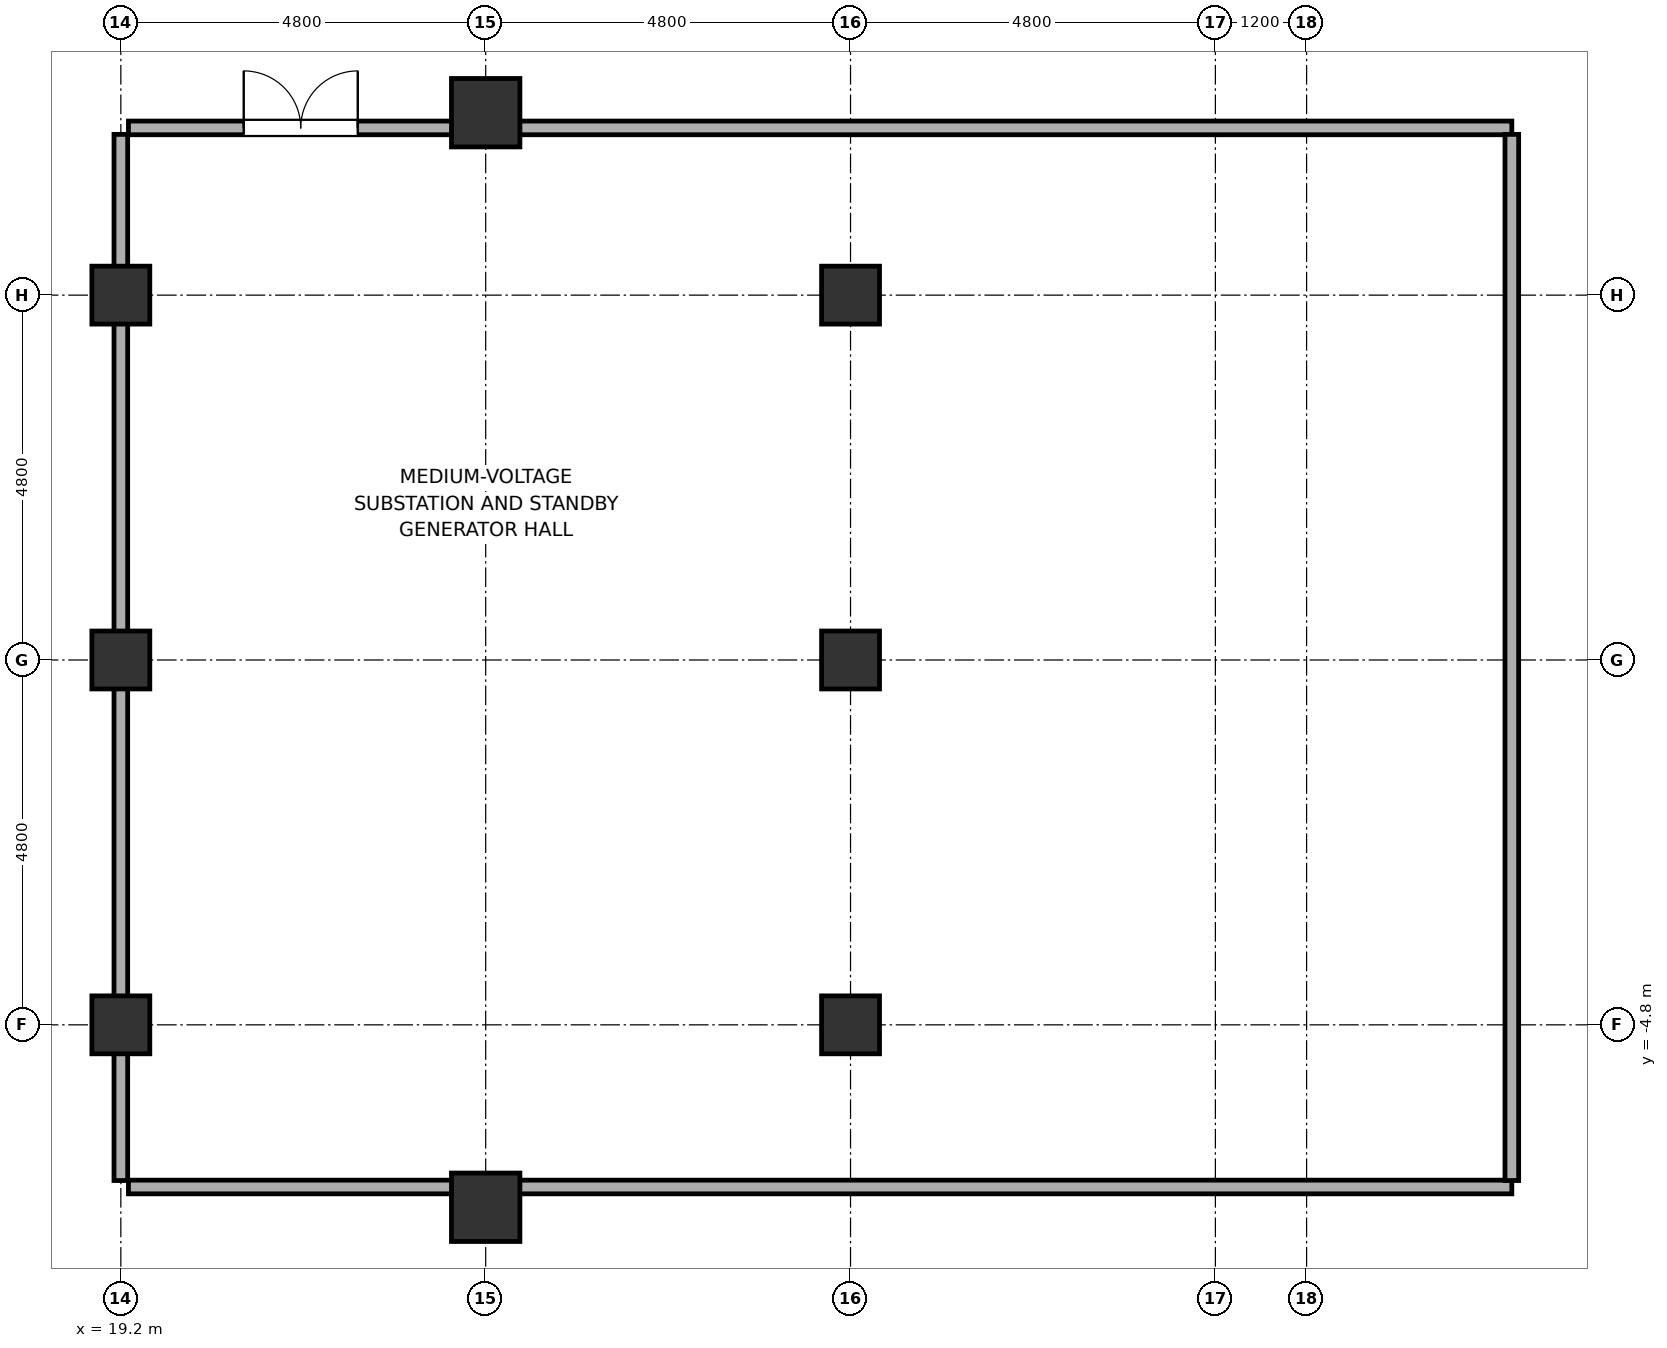
"""IFC4 building model, lengths in metres.
Left out: names, types, materials, properties, quantities, classifications, styles, units other than length and angle.
Written with IfcOpenShell. Run it as: python <this file> out.ifc"""

import sys

from ifc_helpers import new_model, si_unit, direction, frame, frame_2d, origin, origin_2d, place, context, subcontext, project, spatial, rectangle, hollow_rectangle, hollow_circle, extrude, element, fill, save


model = new_model("IFC4")
c1 = context("Model", 3, precision=1e-05, world=origin(), true_north=direction((0.0, 1.0)))
c2 = subcontext(c1, "Body", "Model", "MODEL_VIEW")
j1 = project(units=[si_unit("LENGTHUNIT", "METRE"), si_unit("PLANEANGLEUNIT", "RADIAN")], contexts=[c1])
p1 = place(None, origin())
s1 = spatial("IfcSite", under=j1, at=p1, CompositionType="ELEMENT")
p2 = place(p1, origin())
s2 = spatial("IfcBuilding", under=s1, at=p2, CompositionType="ELEMENT")
p3 = place(p2, frame((0.0, 0.0, -10.2)))
s3 = spatial("IfcBuildingStorey", under=s2, at=p3, CompositionType="ELEMENT", Elevation=-10.2)
for number, where, z_axis, x_axis in (
    (1, (19.2, -4.8, -0.25), (0.0, 0.0, 1.0), (1.0, 0.0, 0.0)),
    (2, (19.2, 0.0, -0.25), (0.0, 0.0, 1.0), (1.0, 0.0, 0.0)),
    (3, (19.2, 4.8, -0.25), (0.0, 0.0, 1.0), (1.0, 0.0, 0.0)),
):
    element("IfcColumn", number, at=place(p3, frame(where, z_axis=z_axis, x_axis=x_axis)), inside=s3, PredefinedType="COLUMN", context=c2, shape_type="SweptSolid", body=[
        extrude(hollow_circle(Radius=0.381, WallThickness=0.032, at=origin_2d()), origin(), (0.0, 0.0, 1.0), 5.05),
    ])
for number, where, z_axis, x_axis in (
    (4, (24.0, -7.2, -0.25), (0.0, 0.0, 1.0), (1.0, 0.0, 0.0)),
    (5, (24.0, 7.2, -0.25), (0.0, 0.0, 1.0), (1.0, 0.0, 0.0)),
):
    element("IfcColumn", number, at=place(p3, frame(where, z_axis=z_axis, x_axis=x_axis)), inside=s3, PredefinedType="COLUMN", context=c2, shape_type="SweptSolid", body=[
        extrude(hollow_rectangle(XDim=0.9, YDim=0.9, WallThickness=0.04, at=origin_2d()), origin(), (0.0, 0.0, 1.0), 5.05),
    ])
for number, where, z_axis, x_axis in (
    (6, (28.8, -4.8, -0.25), (0.0, 0.0, 1.0), (1.0, 0.0, 0.0)),
    (7, (28.8, 0.0, -0.25), (0.0, 0.0, 1.0), (1.0, 0.0, 0.0)),
    (8, (28.8, 4.8, -0.25), (0.0, 0.0, 1.0), (1.0, 0.0, 0.0)),
):
    element("IfcColumn", number, at=place(p3, frame(where, z_axis=z_axis, x_axis=x_axis)), inside=s3, PredefinedType="COLUMN", context=c2, shape_type="SweptSolid", body=[
        extrude(hollow_circle(Radius=0.381, WallThickness=0.032, at=origin_2d()), origin(), (0.0, 0.0, 1.0), 5.05),
    ])
p4 = place(p3, frame((19.3, -6.933, 0.0), z_axis=(0.0, 0.0, 1.0), x_axis=(1.0, 0.0, 0.0)))
e9 = element("IfcWall", 9, at=p4, inside=s3, PredefinedType="PARTITIONING", context=c2, shape_type="SweptSolid", body=[
    extrude(rectangle(XDim=18.2, YDim=0.18, at=frame_2d((9.1, 0.0))), origin(), (0.0, 0.0, 1.0), 3.55),
])
p5 = place(p3, frame((19.3, 7.0, 0.0), z_axis=(0.0, 0.0, 1.0), x_axis=(1.0, 0.0, 0.0)))
e10 = element("IfcWall", 10, at=p5, inside=s3, PredefinedType="PARTITIONING", context=c2, shape_type="SweptSolid", body=[
    extrude(rectangle(XDim=18.2, YDim=0.18, at=frame_2d((9.1, 0.0))), origin(), (0.0, 0.0, 1.0), 3.55),
])
p6 = place(p5, frame((1.517, 0.0, 0.0)))
e11 = element("IfcOpeningElement", 11, at=p6, cuts=e10, PredefinedType="OPENING", context=c2, shape_type="SweptSolid", body=[
    extrude(rectangle(XDim=1.5, YDim=2.2, at=frame_2d((0.75, 1.1))), frame((0.0, 0.105, 0.0), z_axis=(0.0, -1.0, 0.0), x_axis=(1.0, 0.0, 0.0)), (0.0, 0.0, 1.0), 0.21),
])
p7 = place(p3, frame((19.2, -6.848, 0.0), z_axis=(0.0, 0.0, 1.0), x_axis=(0.0, 1.0, 0.0)))
e12 = element("IfcWall", 12, at=p7, inside=s3, PredefinedType="PARTITIONING", context=c2, shape_type="SweptSolid", body=[
    extrude(rectangle(XDim=13.763, YDim=0.18, at=frame_2d((6.882, 0.0))), origin(), (0.0, 0.0, 1.0), 3.55),
])
p8 = place(p3, frame((37.5, -6.848, 0.0), z_axis=(0.0, 0.0, 1.0), x_axis=(0.0, 1.0, 0.0)))
e13 = element("IfcWall", 13, at=p8, inside=s3, PredefinedType="PARTITIONING", context=c2, shape_type="SweptSolid", body=[
    extrude(rectangle(XDim=13.763, YDim=0.18, at=frame_2d((6.882, 0.0))), origin(), (0.0, 0.0, 1.0), 4.55),
])
p9 = place(p6, origin())
e14 = element("IfcDoor", 14, at=p9, inside=s3, OperationType="DOUBLE_DOOR_SINGLE_SWING", PredefinedType="DOOR", context=c2, shape_type="SweptSolid", body=[
    extrude(rectangle(XDim=1.5, YDim=2.2, at=frame_2d((0.75, 1.1))), frame((0.0, 0.025, 0.0), z_axis=(0.0, -1.0, 0.0), x_axis=(1.0, 0.0, 0.0)), (0.0, 0.0, 1.0), 0.05),
])
fill(e11, e14)
save(model, sys.argv[1])
